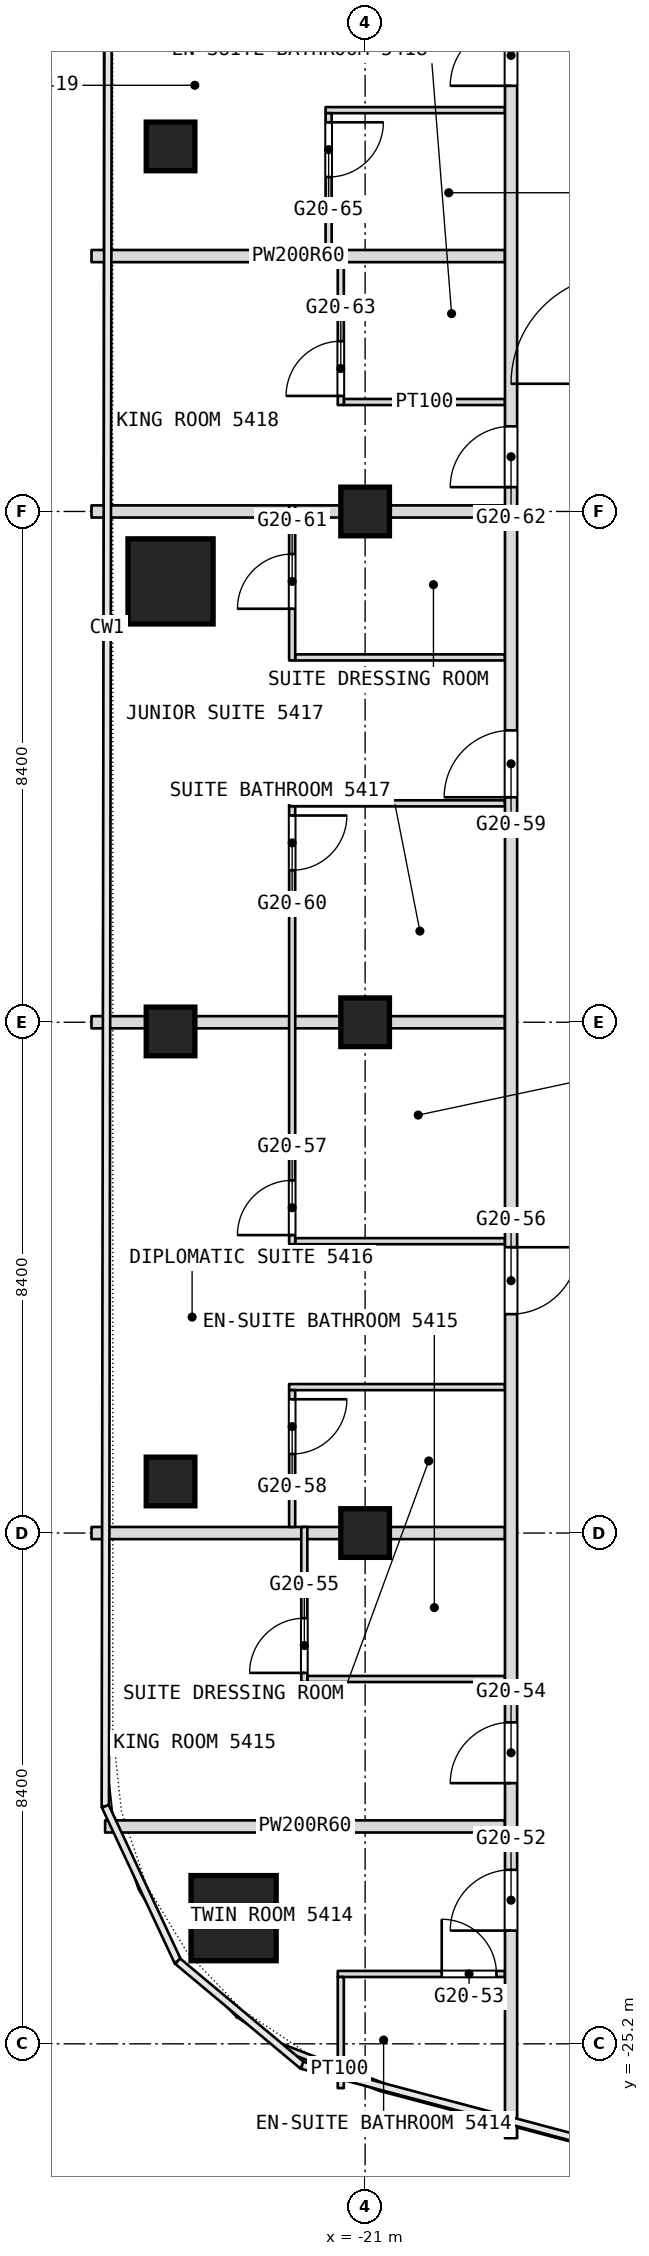
"""IFC4 building model, lengths in metres.
Left out: names, types, materials, properties, quantities, classifications, styles, units other than length and angle.
Written with IfcOpenShell. Run it as: python <this file> out.ifc"""

import sys

from ifc_helpers import new_model, si_unit, direction, frame, frame_2d, origin, origin_2d, place, context, subcontext, project, spatial, rectangle, extrude, element, fill, save


model = new_model("IFC4")
c1 = context("Model", 3, precision=1e-05, world=origin(), true_north=direction((0.0, 1.0)))
c2 = subcontext(c1, "Body", "Model", "MODEL_VIEW")
j1 = project(units=[si_unit("LENGTHUNIT", "METRE"), si_unit("PLANEANGLEUNIT", "RADIAN")], contexts=[c1])
p1 = place(None, origin())
s1 = spatial("IfcSite", under=j1, at=p1, CompositionType="ELEMENT")
p2 = place(p1, origin())
s2 = spatial("IfcBuilding", under=s1, at=p2, CompositionType="ELEMENT")
p3 = place(p2, frame((0.0, 0.0, 230.9)))
s3 = spatial("IfcBuildingStorey", under=s2, at=p3, CompositionType="ELEMENT", Elevation=230.9)
for number, where, z_axis, x_axis in (
    (1, (-23.163, -23.133, 0.0), (0.0, 0.0, 1.0), (1.0, 0.0, 0.0)),
    (2, (-24.2, -1.15, 0.0), (0.0, 0.0, 1.0), (1.0, 0.0, 0.0)),
):
    element("IfcColumn", number, at=place(p3, frame(where, z_axis=z_axis, x_axis=x_axis)), inside=s3, PredefinedType="COLUMN", context=c2, shape_type="SweptSolid", body=[
        extrude(rectangle(XDim=1.4, YDim=1.4, at=origin_2d()), origin(), (0.0, 0.0, 1.0), 3.6),
    ])
for number, where, z_axis, x_axis in (
    (3, (-21.0, -16.8, 0.0), (0.0, 0.0, 1.0), (1.0, 0.0, 0.0)),
    (4, (-21.0, -8.4, 0.0), (0.0, 0.0, 1.0), (1.0, 0.0, 0.0)),
    (5, (-21.0, 0.0, 0.0), (0.0, 0.0, 1.0), (1.0, 0.0, 0.0)),
    (6, (-24.2, -15.952, 0.0), (0.0, 0.0, 1.0), (1.0, 0.0, 0.0)),
    (7, (-24.2, -8.551, 0.0), (0.0, 0.0, 1.0), (1.0, 0.0, 0.0)),
    (8, (-24.2, 6.003, 0.0), (0.0, 0.0, 1.0), (1.0, 0.0, 0.0)),
):
    element("IfcColumn", number, at=place(p3, frame(where, z_axis=z_axis, x_axis=x_axis)), inside=s3, PredefinedType="COLUMN", context=c2, shape_type="SweptSolid", body=[
        extrude(rectangle(XDim=0.8, YDim=0.8, at=origin_2d()), origin(), (0.0, 0.0, 1.0), 3.6),
    ])
p4 = place(p3, frame((-22.386, -25.247, 0.0), z_axis=(0.0, 0.0, 1.0), x_axis=(0.932741240306, -0.360546499959, 0.0)))
e9 = element("IfcWall", 9, at=p4, inside=s3, PredefinedType="PARTITIONING", context=c2, shape_type="SweptSolid", body=[
    extrude(rectangle(XDim=2.066, YDim=0.1, at=frame_2d((1.033, 0.0))), origin(), (0.0, 0.0, 1.0), 3.34),
])
p5 = place(p3, frame((-21.45, -24.051, 0.0), z_axis=(0.0, 0.0, 1.0), x_axis=(1.0, 0.0, 0.0)))
e10 = element("IfcWall", 10, at=p5, inside=s3, PredefinedType="PARTITIONING", context=c2, shape_type="SweptSolid", body=[
    extrude(rectangle(XDim=2.75, YDim=0.1, at=frame_2d((1.375, 0.0))), origin(), (0.0, 0.0, 1.0), 3.34),
])
p6 = place(p5, frame((1.71, 0.0, 0.0)))
e11 = element("IfcOpeningElement", 11, at=p6, cuts=e10, PredefinedType="OPENING", context=c2, shape_type="SweptSolid", body=[
    extrude(rectangle(XDim=0.9, YDim=2.1, at=frame_2d((0.45, 1.05))), frame((0.0, 0.05, 0.0), z_axis=(0.0, -1.0, 0.0), x_axis=(1.0, 0.0, 0.0)), (0.0, 0.0, 1.0), 0.1),
])
p7 = place(p3, frame((-25.276, -21.625, 0.0), z_axis=(0.0, 0.0, 1.0), x_axis=(1.0, 0.0, 0.0)))
e12 = element("IfcWall", 12, at=p7, inside=s3, PredefinedType="PARTITIONING", context=c2, shape_type="SweptSolid", body=[
    extrude(rectangle(XDim=6.576, YDim=0.2, at=frame_2d((3.288, 0.0))), origin(), (0.0, 0.0, 1.0), 3.34),
])
p8 = place(p3, frame((-21.95, -19.2, 0.0), z_axis=(0.0, 0.0, 1.0), x_axis=(1.0, 0.0, 0.0)))
e13 = element("IfcWall", 13, at=p8, inside=s3, PredefinedType="PARTITIONING", context=c2, shape_type="SweptSolid", body=[
    extrude(rectangle(XDim=3.25, YDim=0.1, at=frame_2d((1.625, 0.0))), origin(), (0.0, 0.0, 1.0), 3.34),
])
p9 = place(p3, frame((-25.5, -16.8, 0.0), z_axis=(0.0, 0.0, 1.0), x_axis=(1.0, 0.0, 0.0)))
e14 = element("IfcWall", 14, at=p9, inside=s3, PredefinedType="PARTITIONING", context=c2, shape_type="SweptSolid", body=[
    extrude(rectangle(XDim=6.8, YDim=0.2, at=frame_2d((3.4, 0.0))), origin(), (0.0, 0.0, 1.0), 2.94),
])
p10 = place(p3, frame((-22.25, -14.4, 0.0), z_axis=(0.0, 0.0, 1.0), x_axis=(1.0, 0.0, 0.0)))
e15 = element("IfcWall", 15, at=p10, inside=s3, PredefinedType="PARTITIONING", context=c2, shape_type="SweptSolid", body=[
    extrude(rectangle(XDim=3.55, YDim=0.1, at=frame_2d((1.775, 0.0))), origin(), (0.0, 0.0, 1.0), 3.34),
])
p11 = place(p3, frame((-22.15, -12.0, 0.0), z_axis=(0.0, 0.0, 1.0), x_axis=(1.0, 0.0, 0.0)))
e16 = element("IfcWall", 16, at=p11, inside=s3, PredefinedType="PARTITIONING", context=c2, shape_type="SweptSolid", body=[
    extrude(rectangle(XDim=3.45, YDim=0.1, at=frame_2d((1.725, 0.0))), origin(), (0.0, 0.0, 1.0), 3.34),
])
p12 = place(p3, frame((-25.5, -8.4, 0.0), z_axis=(0.0, 0.0, 1.0), x_axis=(1.0, 0.0, 0.0)))
e17 = element("IfcWall", 17, at=p12, inside=s3, PredefinedType="PARTITIONING", context=c2, shape_type="SweptSolid", body=[
    extrude(rectangle(XDim=6.8, YDim=0.2, at=frame_2d((3.4, 0.0))), origin(), (0.0, 0.0, 1.0), 2.94),
])
p13 = place(p3, frame((-22.25, -4.8, 0.0), z_axis=(0.0, 0.0, 1.0), x_axis=(1.0, 0.0, 0.0)))
e18 = element("IfcWall", 18, at=p13, inside=s3, PredefinedType="PARTITIONING", context=c2, shape_type="SweptSolid", body=[
    extrude(rectangle(XDim=3.55, YDim=0.1, at=frame_2d((1.775, 0.0))), origin(), (0.0, 0.0, 1.0), 3.34),
])
p14 = place(p3, frame((-22.15, -2.4, 0.0), z_axis=(0.0, 0.0, 1.0), x_axis=(1.0, 0.0, 0.0)))
e19 = element("IfcWall", 19, at=p14, inside=s3, PredefinedType="PARTITIONING", context=c2, shape_type="SweptSolid", body=[
    extrude(rectangle(XDim=3.45, YDim=0.1, at=frame_2d((1.725, 0.0))), origin(), (0.0, 0.0, 1.0), 3.34),
])
p15 = place(p3, frame((-25.5, 0.0, 0.0), z_axis=(0.0, 0.0, 1.0), x_axis=(1.0, 0.0, 0.0)))
e20 = element("IfcWall", 20, at=p15, inside=s3, PredefinedType="PARTITIONING", context=c2, shape_type="SweptSolid", body=[
    extrude(rectangle(XDim=6.8, YDim=0.2, at=frame_2d((3.4, 0.0))), origin(), (0.0, 0.0, 1.0), 2.94),
])
p16 = place(p3, frame((-21.35, 1.8, 0.0), z_axis=(0.0, 0.0, 1.0), x_axis=(1.0, 0.0, 0.0)))
e21 = element("IfcWall", 21, at=p16, inside=s3, PredefinedType="PARTITIONING", context=c2, shape_type="SweptSolid", body=[
    extrude(rectangle(XDim=2.65, YDim=0.1, at=frame_2d((1.325, 0.0))), origin(), (0.0, 0.0, 1.0), 3.34),
])
p17 = place(p3, frame((-25.5, 4.2, 0.0), z_axis=(0.0, 0.0, 1.0), x_axis=(1.0, 0.0, 0.0)))
e22 = element("IfcWall", 22, at=p17, inside=s3, PredefinedType="PARTITIONING", context=c2, shape_type="SweptSolid", body=[
    extrude(rectangle(XDim=6.8, YDim=0.2, at=frame_2d((3.4, 0.0))), origin(), (0.0, 0.0, 1.0), 3.34),
])
p18 = place(p3, frame((-21.65, 6.6, 0.0), z_axis=(0.0, 0.0, 1.0), x_axis=(1.0, 0.0, 0.0)))
e23 = element("IfcWall", 23, at=p18, inside=s3, PredefinedType="PARTITIONING", context=c2, shape_type="SweptSolid", body=[
    extrude(rectangle(XDim=2.95, YDim=0.1, at=frame_2d((1.475, 0.0))), origin(), (0.0, 0.0, 1.0), 3.34),
])
p19 = place(p3, frame((-18.6, -26.751, 0.0), z_axis=(0.0, 0.0, 1.0), x_axis=(0.0, 1.0, 0.0)))
e24 = element("IfcWall", 24, at=p19, inside=s3, PredefinedType="PARTITIONING", context=c2, shape_type="SweptSolid", body=[
    extrude(rectangle(XDim=49.091, YDim=0.2, at=frame_2d((24.545, 0.0))), origin(), (0.0, 0.0, 1.0), 3.34),
])
p20 = place(p19, frame((3.413, 0.0, 0.0)))
e25 = element("IfcOpeningElement", 25, at=p20, cuts=e24, PredefinedType="OPENING", context=c2, shape_type="SweptSolid", body=[
    extrude(rectangle(XDim=1.0, YDim=2.1, at=frame_2d((0.5, 1.05))), frame((0.0, 0.1, 0.0), z_axis=(0.0, -1.0, 0.0), x_axis=(1.0, 0.0, 0.0)), (0.0, 0.0, 1.0), 0.2),
])
p21 = place(p19, frame((5.838, 0.0, 0.0)))
e26 = element("IfcOpeningElement", 26, at=p21, cuts=e24, PredefinedType="OPENING", context=c2, shape_type="SweptSolid", body=[
    extrude(rectangle(XDim=1.0, YDim=2.1, at=frame_2d((0.5, 1.05))), frame((0.0, 0.1, 0.0), z_axis=(0.0, -1.0, 0.0), x_axis=(1.0, 0.0, 0.0)), (0.0, 0.0, 1.0), 0.2),
])
p22 = place(p19, frame((13.551, 0.0, 0.0)))
e27 = element("IfcOpeningElement", 27, at=p22, cuts=e24, PredefinedType="OPENING", context=c2, shape_type="SweptSolid", body=[
    extrude(rectangle(XDim=1.1, YDim=2.1, at=frame_2d((0.55, 1.05))), frame((0.0, 0.1, 0.0), z_axis=(0.0, -1.0, 0.0), x_axis=(1.0, 0.0, 0.0)), (0.0, 0.0, 1.0), 0.2),
])
p23 = place(p19, frame((22.051, 0.0, 0.0)))
e28 = element("IfcOpeningElement", 28, at=p23, cuts=e24, PredefinedType="OPENING", context=c2, shape_type="SweptSolid", body=[
    extrude(rectangle(XDim=1.1, YDim=2.1, at=frame_2d((0.55, 1.05))), frame((0.0, 0.1, 0.0), z_axis=(0.0, -1.0, 0.0), x_axis=(1.0, 0.0, 0.0)), (0.0, 0.0, 1.0), 0.2),
])
p24 = place(p19, frame((27.151, 0.0, 0.0)))
e29 = element("IfcOpeningElement", 29, at=p24, cuts=e24, PredefinedType="OPENING", context=c2, shape_type="SweptSolid", body=[
    extrude(rectangle(XDim=1.0, YDim=2.1, at=frame_2d((0.5, 1.05))), frame((0.0, 0.1, 0.0), z_axis=(0.0, -1.0, 0.0), x_axis=(1.0, 0.0, 0.0)), (0.0, 0.0, 1.0), 0.2),
])
p25 = place(p19, frame((33.751, 0.0, 0.0)))
e30 = element("IfcOpeningElement", 30, at=p25, cuts=e24, PredefinedType="OPENING", context=c2, shape_type="SweptSolid", body=[
    extrude(rectangle(XDim=1.0, YDim=2.1, at=frame_2d((0.5, 1.05))), frame((0.0, 0.1, 0.0), z_axis=(0.0, -1.0, 0.0), x_axis=(1.0, 0.0, 0.0)), (0.0, 0.0, 1.0), 0.2),
])
p26 = place(p19, frame((37.951, 0.0, 0.0)))
e31 = element("IfcOpeningElement", 31, at=p26, cuts=e24, PredefinedType="OPENING", context=c2, shape_type="SweptSolid", body=[
    extrude(rectangle(XDim=1.0, YDim=2.1, at=frame_2d((0.5, 1.05))), frame((0.0, 0.1, 0.0), z_axis=(0.0, -1.0, 0.0), x_axis=(1.0, 0.0, 0.0)), (0.0, 0.0, 1.0), 0.2),
])
p27 = place(p19, frame((39.751, 0.0, 0.0)))
e32 = element("IfcOpeningElement", 32, at=p27, cuts=e24, PredefinedType="OPENING", context=c2, shape_type="SweptSolid", body=[
    extrude(rectangle(XDim=1.0, YDim=2.1, at=frame_2d((0.5, 1.05))), frame((0.0, 0.1, 0.0), z_axis=(0.0, -1.0, 0.0), x_axis=(1.0, 0.0, 0.0)), (0.0, 0.0, 1.0), 0.2),
])
p28 = place(p19, frame((44.051, 0.0, 0.0)))
e33 = element("IfcOpeningElement", 33, at=p28, cuts=e24, PredefinedType="OPENING", context=c2, shape_type="SweptSolid", body=[
    extrude(rectangle(XDim=1.0, YDim=2.1, at=frame_2d((0.5, 1.05))), frame((0.0, 0.1, 0.0), z_axis=(0.0, -1.0, 0.0), x_axis=(1.0, 0.0, 0.0)), (0.0, 0.0, 1.0), 0.2),
])
p29 = place(p3, frame((-21.4, -25.928, 0.0), z_axis=(0.0, 0.0, 1.0), x_axis=(0.0, 1.0, 0.0)))
e34 = element("IfcWall", 34, at=p29, inside=s3, PredefinedType="PARTITIONING", context=c2, shape_type="SweptSolid", body=[
    extrude(rectangle(XDim=1.827, YDim=0.1, at=frame_2d((0.914, 0.0))), origin(), (0.0, 0.0, 1.0), 3.34),
])
p30 = place(p3, frame((-21.4, 1.75, 0.0), z_axis=(0.0, 0.0, 1.0), x_axis=(0.0, 1.0, 0.0)))
e35 = element("IfcWall", 35, at=p30, inside=s3, PredefinedType="PARTITIONING", context=c2, shape_type="SweptSolid", body=[
    extrude(rectangle(XDim=2.55, YDim=0.1, at=frame_2d((1.275, 0.0))), origin(), (0.0, 0.0, 1.0), 3.34),
])
p31 = place(p30, frame((0.15, 0.0, 0.0)))
e36 = element("IfcOpeningElement", 36, at=p31, cuts=e35, PredefinedType="OPENING", context=c2, shape_type="SweptSolid", body=[
    extrude(rectangle(XDim=0.9, YDim=2.1, at=frame_2d((0.45, 1.05))), frame((0.0, 0.05, 0.0), z_axis=(0.0, -1.0, 0.0), x_axis=(1.0, 0.0, 0.0)), (0.0, 0.0, 1.0), 0.1),
])
p32 = place(p3, frame((-21.6, 4.3, 0.0), z_axis=(0.0, 0.0, 1.0), x_axis=(0.0, 1.0, 0.0)))
e37 = element("IfcWall", 37, at=p32, inside=s3, PredefinedType="PARTITIONING", context=c2, shape_type="SweptSolid", body=[
    extrude(rectangle(XDim=2.25, YDim=0.1, at=frame_2d((1.125, 0.0))), origin(), (0.0, 0.0, 1.0), 3.34),
])
p33 = place(p32, frame((1.2, 0.0, 0.0)))
e38 = element("IfcOpeningElement", 38, at=p33, cuts=e37, PredefinedType="OPENING", context=c2, shape_type="SweptSolid", body=[
    extrude(rectangle(XDim=0.9, YDim=2.1, at=frame_2d((0.45, 1.05))), frame((0.0, 0.05, 0.0), z_axis=(0.0, -1.0, 0.0), x_axis=(1.0, 0.0, 0.0)), (0.0, 0.0, 1.0), 0.1),
])
p34 = place(p3, frame((-22.0, -19.25, 0.0), z_axis=(0.0, 0.0, 1.0), x_axis=(0.0, 1.0, 0.0)))
e39 = element("IfcWall", 39, at=p34, inside=s3, PredefinedType="PARTITIONING", context=c2, shape_type="SweptSolid", body=[
    extrude(rectangle(XDim=2.55, YDim=0.1, at=frame_2d((1.275, 0.0))), origin(), (0.0, 0.0, 1.0), 3.34),
])
p35 = place(p34, frame((0.15, 0.0, 0.0)))
e40 = element("IfcOpeningElement", 40, at=p35, cuts=e39, PredefinedType="OPENING", context=c2, shape_type="SweptSolid", body=[
    extrude(rectangle(XDim=0.9, YDim=2.1, at=frame_2d((0.45, 1.05))), frame((0.0, 0.05, 0.0), z_axis=(0.0, -1.0, 0.0), x_axis=(1.0, 0.0, 0.0)), (0.0, 0.0, 1.0), 0.1),
])
p36 = place(p3, frame((-22.2, -16.7, 0.0), z_axis=(0.0, 0.0, 1.0), x_axis=(0.0, 1.0, 0.0)))
e41 = element("IfcWall", 41, at=p36, inside=s3, PredefinedType="PARTITIONING", context=c2, shape_type="SweptSolid", body=[
    extrude(rectangle(XDim=2.25, YDim=0.1, at=frame_2d((1.125, 0.0))), origin(), (0.0, 0.0, 1.0), 3.34),
])
p37 = place(p36, frame((1.2, 0.0, 0.0)))
e42 = element("IfcOpeningElement", 42, at=p37, cuts=e41, PredefinedType="OPENING", context=c2, shape_type="SweptSolid", body=[
    extrude(rectangle(XDim=0.9, YDim=2.1, at=frame_2d((0.45, 1.05))), frame((0.0, 0.05, 0.0), z_axis=(0.0, -1.0, 0.0), x_axis=(1.0, 0.0, 0.0)), (0.0, 0.0, 1.0), 0.1),
])
p38 = place(p3, frame((-22.2, -12.05, 0.0), z_axis=(0.0, 0.0, 1.0), x_axis=(0.0, 1.0, 0.0)))
e43 = element("IfcWall", 43, at=p38, inside=s3, PredefinedType="PARTITIONING", context=c2, shape_type="SweptSolid", body=[
    extrude(rectangle(XDim=7.2, YDim=0.1, at=frame_2d((3.6, 0.0))), origin(), (0.0, 0.0, 1.0), 3.34),
])
p39 = place(p38, frame((0.15, 0.0, 0.0)))
e44 = element("IfcOpeningElement", 44, at=p39, cuts=e43, PredefinedType="OPENING", context=c2, shape_type="SweptSolid", body=[
    extrude(rectangle(XDim=0.9, YDim=2.1, at=frame_2d((0.45, 1.05))), frame((0.0, 0.05, 0.0), z_axis=(0.0, -1.0, 0.0), x_axis=(1.0, 0.0, 0.0)), (0.0, 0.0, 1.0), 0.1),
])
p40 = place(p38, frame((6.15, 0.0, 0.0)))
e45 = element("IfcOpeningElement", 45, at=p40, cuts=e43, PredefinedType="OPENING", context=c2, shape_type="SweptSolid", body=[
    extrude(rectangle(XDim=0.9, YDim=2.1, at=frame_2d((0.45, 1.05))), frame((0.0, 0.05, 0.0), z_axis=(0.0, -1.0, 0.0), x_axis=(1.0, 0.0, 0.0)), (0.0, 0.0, 1.0), 0.1),
])
p41 = place(p3, frame((-22.2, -2.45, 0.0), z_axis=(0.0, 0.0, 1.0), x_axis=(0.0, 1.0, 0.0)))
e46 = element("IfcWall", 46, at=p41, inside=s3, PredefinedType="PARTITIONING", context=c2, shape_type="SweptSolid", body=[
    extrude(rectangle(XDim=2.55, YDim=0.1, at=frame_2d((1.275, 0.0))), origin(), (0.0, 0.0, 1.0), 3.34),
])
p42 = place(p41, frame((0.85, 0.0, 0.0)))
e47 = element("IfcOpeningElement", 47, at=p42, cuts=e46, PredefinedType="OPENING", context=c2, shape_type="SweptSolid", body=[
    extrude(rectangle(XDim=0.9, YDim=2.1, at=frame_2d((0.45, 1.05))), frame((0.0, 0.05, 0.0), z_axis=(0.0, -1.0, 0.0), x_axis=(1.0, 0.0, 0.0)), (0.0, 0.0, 1.0), 0.1),
])
p43 = place(p6, origin())
e48 = element("IfcDoor", 48, at=p43, inside=s3, OperationType="SINGLE_SWING_LEFT", PredefinedType="DOOR", context=c2, shape_type="SweptSolid", body=[
    extrude(rectangle(XDim=0.9, YDim=2.1, at=frame_2d((0.45, 1.05))), frame((0.0, 0.025, 0.0), z_axis=(0.0, -1.0, 0.0), x_axis=(1.0, 0.0, 0.0)), (0.0, 0.0, 1.0), 0.05),
])
fill(e11, e48)
p44 = place(p20, origin())
e49 = element("IfcDoor", 49, at=p44, inside=s3, OperationType="SINGLE_SWING_LEFT", PredefinedType="DOOR", context=c2, shape_type="SweptSolid", body=[
    extrude(rectangle(XDim=1.0, YDim=2.1, at=frame_2d((0.5, 1.05))), frame((0.0, 0.025, 0.0), z_axis=(0.0, -1.0, 0.0), x_axis=(1.0, 0.0, 0.0)), (0.0, 0.0, 1.0), 0.05),
])
fill(e25, e49)
p45 = place(p21, origin())
e50 = element("IfcDoor", 50, at=p45, inside=s3, OperationType="SINGLE_SWING_LEFT", PredefinedType="DOOR", context=c2, shape_type="SweptSolid", body=[
    extrude(rectangle(XDim=1.0, YDim=2.1, at=frame_2d((0.5, 1.05))), frame((0.0, 0.025, 0.0), z_axis=(0.0, -1.0, 0.0), x_axis=(1.0, 0.0, 0.0)), (0.0, 0.0, 1.0), 0.05),
])
fill(e26, e50)
p46 = place(p22, origin())
e51 = element("IfcDoor", 51, at=p46, inside=s3, OperationType="SINGLE_SWING_RIGHT", PredefinedType="DOOR", context=c2, shape_type="SweptSolid", body=[
    extrude(rectangle(XDim=1.1, YDim=2.1, at=frame_2d((0.55, 1.05))), frame((0.0, 0.025, 0.0), z_axis=(0.0, -1.0, 0.0), x_axis=(1.0, 0.0, 0.0)), (0.0, 0.0, 1.0), 0.05),
])
fill(e27, e51)
p47 = place(p23, origin())
e52 = element("IfcDoor", 52, at=p47, inside=s3, OperationType="SINGLE_SWING_LEFT", PredefinedType="DOOR", context=c2, shape_type="SweptSolid", body=[
    extrude(rectangle(XDim=1.1, YDim=2.1, at=frame_2d((0.55, 1.05))), frame((0.0, 0.025, 0.0), z_axis=(0.0, -1.0, 0.0), x_axis=(1.0, 0.0, 0.0)), (0.0, 0.0, 1.0), 0.05),
])
fill(e28, e52)
p48 = place(p24, origin())
e53 = element("IfcDoor", 53, at=p48, inside=s3, OperationType="SINGLE_SWING_LEFT", PredefinedType="DOOR", context=c2, shape_type="SweptSolid", body=[
    extrude(rectangle(XDim=1.0, YDim=2.1, at=frame_2d((0.5, 1.05))), frame((0.0, 0.025, 0.0), z_axis=(0.0, -1.0, 0.0), x_axis=(1.0, 0.0, 0.0)), (0.0, 0.0, 1.0), 0.05),
])
fill(e29, e53)
p49 = place(p25, origin())
e54 = element("IfcDoor", 54, at=p49, inside=s3, OperationType="SINGLE_SWING_LEFT", PredefinedType="DOOR", context=c2, shape_type="SweptSolid", body=[
    extrude(rectangle(XDim=1.0, YDim=2.1, at=frame_2d((0.5, 1.05))), frame((0.0, 0.025, 0.0), z_axis=(0.0, -1.0, 0.0), x_axis=(1.0, 0.0, 0.0)), (0.0, 0.0, 1.0), 0.05),
])
fill(e30, e54)
p50 = place(p31, origin())
e55 = element("IfcDoor", 55, at=p50, inside=s3, OperationType="SINGLE_SWING_RIGHT", PredefinedType="DOOR", context=c2, shape_type="SweptSolid", body=[
    extrude(rectangle(XDim=0.9, YDim=2.1, at=frame_2d((0.45, 1.05))), frame((0.0, 0.025, 0.0), z_axis=(0.0, -1.0, 0.0), x_axis=(1.0, 0.0, 0.0)), (0.0, 0.0, 1.0), 0.05),
])
fill(e36, e55)
p51 = place(p33, origin())
e56 = element("IfcDoor", 56, at=p51, inside=s3, OperationType="SINGLE_SWING_LEFT", PredefinedType="DOOR", context=c2, shape_type="SweptSolid", body=[
    extrude(rectangle(XDim=0.9, YDim=2.1, at=frame_2d((0.45, 1.05))), frame((0.0, 0.025, 0.0), z_axis=(0.0, -1.0, 0.0), x_axis=(1.0, 0.0, 0.0)), (0.0, 0.0, 1.0), 0.05),
])
fill(e38, e56)
p52 = place(p35, origin())
e57 = element("IfcDoor", 57, at=p52, inside=s3, OperationType="SINGLE_SWING_RIGHT", PredefinedType="DOOR", context=c2, shape_type="SweptSolid", body=[
    extrude(rectangle(XDim=0.9, YDim=2.1, at=frame_2d((0.45, 1.05))), frame((0.0, 0.025, 0.0), z_axis=(0.0, -1.0, 0.0), x_axis=(1.0, 0.0, 0.0)), (0.0, 0.0, 1.0), 0.05),
])
fill(e40, e57)
p53 = place(p37, origin())
e58 = element("IfcDoor", 58, at=p53, inside=s3, OperationType="SINGLE_SWING_LEFT", PredefinedType="DOOR", context=c2, shape_type="SweptSolid", body=[
    extrude(rectangle(XDim=0.9, YDim=2.1, at=frame_2d((0.45, 1.05))), frame((0.0, 0.025, 0.0), z_axis=(0.0, -1.0, 0.0), x_axis=(1.0, 0.0, 0.0)), (0.0, 0.0, 1.0), 0.05),
])
fill(e42, e58)
p54 = place(p39, origin())
e59 = element("IfcDoor", 59, at=p54, inside=s3, OperationType="SINGLE_SWING_RIGHT", PredefinedType="DOOR", context=c2, shape_type="SweptSolid", body=[
    extrude(rectangle(XDim=0.9, YDim=2.1, at=frame_2d((0.45, 1.05))), frame((0.0, 0.025, 0.0), z_axis=(0.0, -1.0, 0.0), x_axis=(1.0, 0.0, 0.0)), (0.0, 0.0, 1.0), 0.05),
])
fill(e44, e59)
p55 = place(p40, origin())
e60 = element("IfcDoor", 60, at=p55, inside=s3, OperationType="SINGLE_SWING_LEFT", PredefinedType="DOOR", context=c2, shape_type="SweptSolid", body=[
    extrude(rectangle(XDim=0.9, YDim=2.1, at=frame_2d((0.45, 1.05))), frame((0.0, 0.025, 0.0), z_axis=(0.0, -1.0, 0.0), x_axis=(1.0, 0.0, 0.0)), (0.0, 0.0, 1.0), 0.05),
])
fill(e45, e60)
p56 = place(p42, origin())
e61 = element("IfcDoor", 61, at=p56, inside=s3, OperationType="SINGLE_SWING_LEFT", PredefinedType="DOOR", context=c2, shape_type="SweptSolid", body=[
    extrude(rectangle(XDim=0.9, YDim=2.1, at=frame_2d((0.45, 1.05))), frame((0.0, 0.025, 0.0), z_axis=(0.0, -1.0, 0.0), x_axis=(1.0, 0.0, 0.0)), (0.0, 0.0, 1.0), 0.05),
])
fill(e47, e61)
save(model, sys.argv[1])
